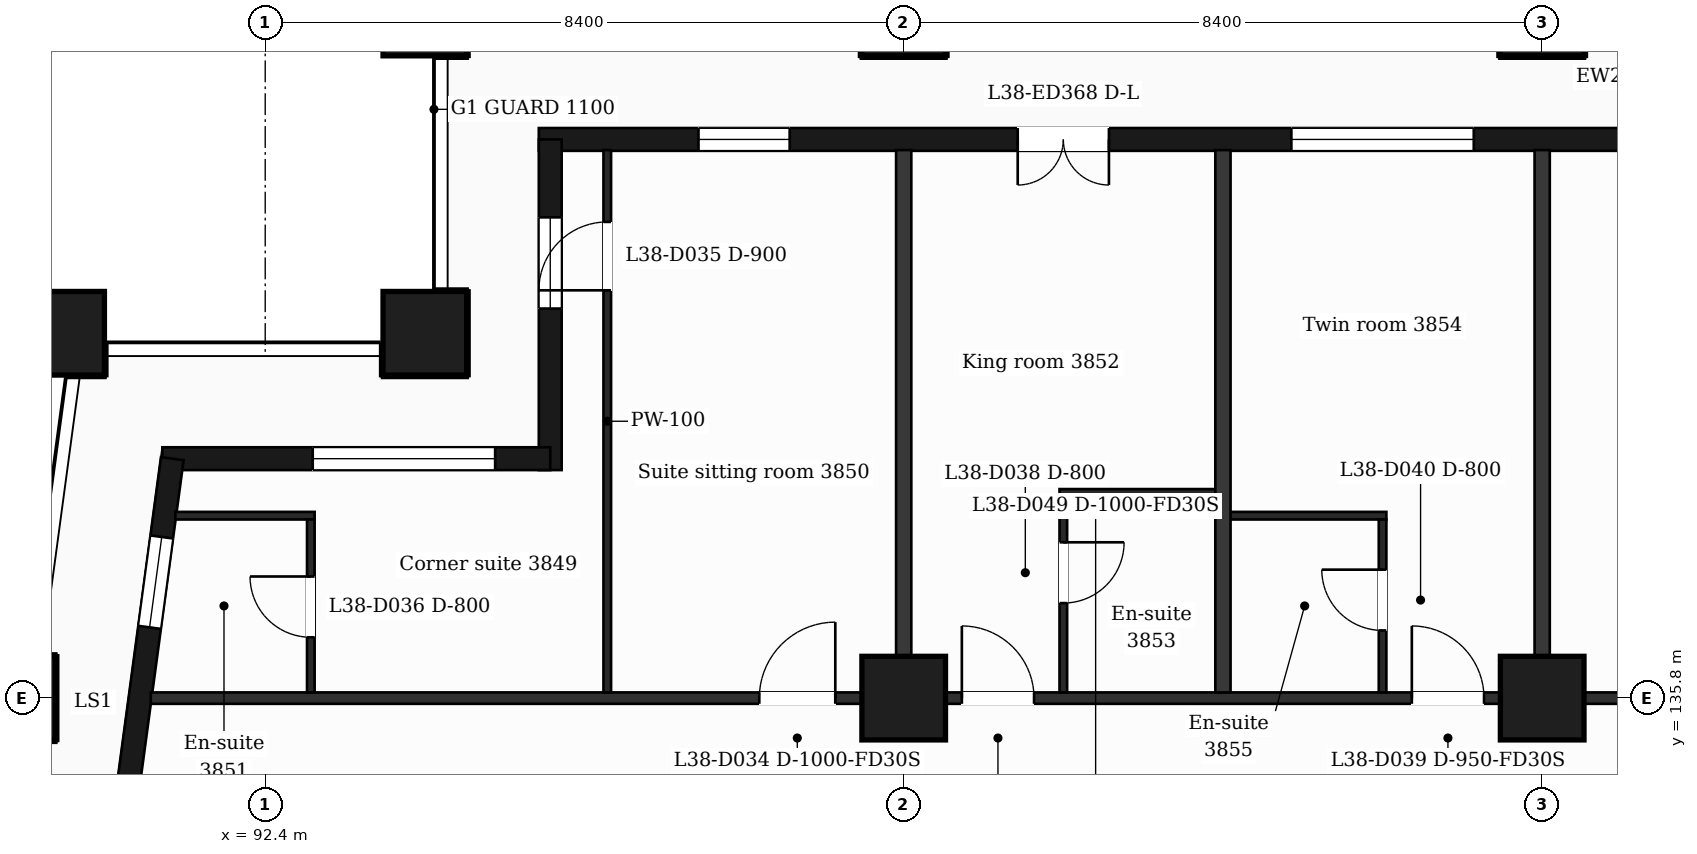
"""IFC4 building model, lengths in metres.
Left out: names, types, materials, properties, quantities, classifications, styles, units other than length and angle.
Written with IfcOpenShell. Run it as: python <this file> out.ifc"""

import sys

from ifc_helpers import new_model, si_unit, direction, frame, frame_2d, origin, origin_2d, place, context, subcontext, project, spatial, rectangle, extrude, element, fill, save


model = new_model("IFC4")
c1 = context("Model", 3, precision=1e-05, world=origin(), true_north=direction((0.0, 1.0)))
c2 = subcontext(c1, "Body", "Model", "MODEL_VIEW")
j1 = project(units=[si_unit("LENGTHUNIT", "METRE"), si_unit("PLANEANGLEUNIT", "RADIAN")], contexts=[c1])
p1 = place(None, origin())
s1 = spatial("IfcSite", under=j1, at=p1, CompositionType="ELEMENT")
p2 = place(p1, origin())
s2 = spatial("IfcBuilding", under=s1, at=p2, CompositionType="ELEMENT")
p3 = place(p2, frame((0.0, 0.0, 162.6)))
s3 = spatial("IfcBuildingStorey", under=s2, at=p3, CompositionType="ELEMENT", Elevation=162.6)
for number, where, z_axis, x_axis in (
    (1, (94.5, 140.6, 0.0), (0.0, 0.0, 1.0), (1.0, 0.0, 0.0)),
    (2, (89.735, 140.6, 0.0), (0.0, 0.0, 1.0), (1.0, 0.0, 0.0)),
    (3, (100.8, 135.8, 0.0), (0.0, 0.0, 1.0), (1.0, 0.0, 0.0)),
    (4, (109.2, 135.8, 0.0), (0.0, 0.0, 1.0), (1.0, 0.0, 0.0)),
    (5, (89.088, 135.8, 0.0), (0.0, 0.0, 1.0), (1.0, 0.0, 0.0)),
    (6, (100.8, 144.8, 0.0), (0.0, 0.0, 1.0), (1.0, 0.0, 0.0)),
    (7, (109.2, 144.8, 0.0), (0.0, 0.0, 1.0), (1.0, 0.0, 0.0)),
    (8, (94.5, 144.8, 0.0), (0.0, 0.0, 1.0), (1.0, 0.0, 0.0)),
):
    element("IfcColumn", number, at=place(p3, frame(where, z_axis=z_axis, x_axis=x_axis)), inside=s3, PredefinedType="COLUMN", context=c2, shape_type="SweptSolid", body=[
        extrude(rectangle(XDim=1.1, YDim=1.1, at=origin_2d()), origin(), (0.0, 0.0, 1.0), 3.7),
    ])
p4 = place(p3, frame((110.4, 143.15, 0.0), z_axis=(0.0, 0.0, 1.0), x_axis=(-1.0, 0.0, 0.0)))
e9 = element("IfcWall", 9, at=p4, inside=s3, PredefinedType="SOLIDWALL", context=c2, shape_type="SweptSolid", body=[
    extrude(rectangle(XDim=14.4, YDim=0.3, at=frame_2d((7.2, 0.0))), origin(), (0.0, 0.0, 1.0), 3.38),
])
p5 = place(p4, frame((2.1, 0.0, 0.9)))
e10 = element("IfcOpeningElement", 10, at=p5, cuts=e9, PredefinedType="OPENING", context=c2, shape_type="SweptSolid", body=[
    extrude(rectangle(XDim=2.4, YDim=2.1, at=frame_2d((1.2, 1.05))), frame((0.0, 0.16, 0.0), z_axis=(0.0, -1.0, 0.0), x_axis=(1.0, 0.0, 0.0)), (0.0, 0.0, 1.0), 0.32),
])
p6 = place(p4, frame((6.9, 0.0, 0.0)))
e11 = element("IfcOpeningElement", 11, at=p6, cuts=e9, PredefinedType="OPENING", context=c2, shape_type="SweptSolid", body=[
    extrude(rectangle(XDim=1.2, YDim=2.4, at=frame_2d((0.6, 1.2))), frame((0.0, 0.16, 0.0), z_axis=(0.0, -1.0, 0.0), x_axis=(1.0, 0.0, 0.0)), (0.0, 0.0, 1.0), 0.32),
])
p7 = place(p4, frame((11.1, 0.0, 0.9)))
e12 = element("IfcOpeningElement", 12, at=p7, cuts=e9, PredefinedType="OPENING", context=c2, shape_type="SweptSolid", body=[
    extrude(rectangle(XDim=1.2, YDim=2.1, at=frame_2d((0.6, 1.05))), frame((0.0, 0.16, 0.0), z_axis=(0.0, -1.0, 0.0), x_axis=(1.0, 0.0, 0.0)), (0.0, 0.0, 1.0), 0.32),
])
p8 = place(p3, frame((96.15, 143.15, 0.0), z_axis=(0.0, 0.0, 1.0), x_axis=(0.0, -1.0, 0.0)))
e13 = element("IfcWall", 13, at=p8, inside=s3, PredefinedType="SOLIDWALL", context=c2, shape_type="SweptSolid", body=[
    extrude(rectangle(XDim=4.35, YDim=0.3, at=frame_2d((2.175, 0.0))), origin(), (0.0, 0.0, 1.0), 3.38),
])
p9 = place(p8, frame((1.025, 0.0, 0.9)))
e14 = element("IfcOpeningElement", 14, at=p9, cuts=e13, PredefinedType="OPENING", context=c2, shape_type="SweptSolid", body=[
    extrude(rectangle(XDim=1.2, YDim=2.1, at=frame_2d((0.6, 1.05))), frame((0.0, 0.16, 0.0), z_axis=(0.0, -1.0, 0.0), x_axis=(1.0, 0.0, 0.0)), (0.0, 0.0, 1.0), 0.32),
])
p10 = place(p3, frame((96.15, 138.95, 0.0), z_axis=(0.0, 0.0, 1.0), x_axis=(-1.0, 0.0, 0.0)))
e15 = element("IfcWall", 15, at=p10, inside=s3, PredefinedType="SOLIDWALL", context=c2, shape_type="SweptSolid", body=[
    extrude(rectangle(XDim=5.104, YDim=0.3, at=frame_2d((2.552, 0.0))), origin(), (0.0, 0.0, 1.0), 3.38),
])
p11 = place(p10, frame((0.725, 0.0, 0.9)))
e16 = element("IfcOpeningElement", 16, at=p11, cuts=e15, PredefinedType="OPENING", context=c2, shape_type="SweptSolid", body=[
    extrude(rectangle(XDim=2.4, YDim=2.1, at=frame_2d((1.2, 1.05))), frame((0.0, 0.16, 0.0), z_axis=(0.0, -1.0, 0.0), x_axis=(1.0, 0.0, 0.0)), (0.0, 0.0, 1.0), 0.32),
])
p12 = place(p3, frame((91.177, 138.95, 0.0), z_axis=(0.0, 0.0, 1.0), x_axis=(-0.133426664613, -0.991058689065, 0.0)))
e17 = element("IfcWall", 17, at=p12, inside=s3, PredefinedType="SOLIDWALL", context=c2, shape_type="SweptSolid", body=[
    extrude(rectangle(XDim=6.609, YDim=0.3, at=frame_2d((3.305, 0.0))), origin(), (0.0, 0.0, 1.0), 3.38),
])
p13 = place(p12, frame((1.039, 0.0, 0.9)))
e18 = element("IfcOpeningElement", 18, at=p13, cuts=e17, PredefinedType="OPENING", context=c2, shape_type="SweptSolid", body=[
    extrude(rectangle(XDim=1.2, YDim=2.1, at=frame_2d((0.6, 1.05))), frame((0.0, 0.16, 0.0), z_axis=(0.0, -1.0, 0.0), x_axis=(1.0, 0.0, 0.0)), (0.0, 0.0, 1.0), 0.32),
])
p14 = place(p12, frame((4.294, 0.0, 0.0)))
e19 = element("IfcOpeningElement", 19, at=p14, cuts=e17, PredefinedType="OPENING", context=c2, shape_type="SweptSolid", body=[
    extrude(rectangle(XDim=1.2, YDim=2.4, at=frame_2d((0.6, 1.2))), frame((0.0, 0.16, 0.0), z_axis=(0.0, -1.0, 0.0), x_axis=(1.0, 0.0, 0.0)), (0.0, 0.0, 1.0), 0.32),
])
p15 = place(p3, frame((90.895, 135.8, 0.0), z_axis=(0.0, 0.0, 1.0), x_axis=(1.0, 0.0, 0.0)))
e20 = element("IfcWall", 20, at=p15, inside=s3, PredefinedType="PARTITIONING", context=c2, shape_type="SweptSolid", body=[
    extrude(rectangle(XDim=45.011, YDim=0.15, at=frame_2d((22.505, 0.0))), origin(), (0.0, 0.0, 1.0), 3.38),
])
p16 = place(p15, frame((8.005, 0.0, 0.0)))
e21 = element("IfcOpeningElement", 21, at=p16, cuts=e20, PredefinedType="OPENING", context=c2, shape_type="SweptSolid", body=[
    extrude(rectangle(XDim=1.0, YDim=2.1, at=frame_2d((0.5, 1.05))), frame((0.0, 0.085, 0.0), z_axis=(0.0, -1.0, 0.0), x_axis=(1.0, 0.0, 0.0)), (0.0, 0.0, 1.0), 0.17),
])
p17 = place(p15, frame((10.67, 0.0, 0.0)))
e22 = element("IfcOpeningElement", 22, at=p17, cuts=e20, PredefinedType="OPENING", context=c2, shape_type="SweptSolid", body=[
    extrude(rectangle(XDim=0.95, YDim=2.1, at=frame_2d((0.475, 1.05))), frame((0.0, 0.085, 0.0), z_axis=(0.0, -1.0, 0.0), x_axis=(1.0, 0.0, 0.0)), (0.0, 0.0, 1.0), 0.17),
])
p18 = place(p15, frame((16.59, 0.0, 0.0)))
e23 = element("IfcOpeningElement", 23, at=p18, cuts=e20, PredefinedType="OPENING", context=c2, shape_type="SweptSolid", body=[
    extrude(rectangle(XDim=0.95, YDim=2.1, at=frame_2d((0.475, 1.05))), frame((0.0, 0.085, 0.0), z_axis=(0.0, -1.0, 0.0), x_axis=(1.0, 0.0, 0.0)), (0.0, 0.0, 1.0), 0.17),
])
p19 = place(p15, frame((20.98, 0.0, 0.0)))
e24 = element("IfcOpeningElement", 24, at=p19, cuts=e20, PredefinedType="OPENING", context=c2, shape_type="SweptSolid", body=[
    extrude(rectangle(XDim=0.95, YDim=2.1, at=frame_2d((0.475, 1.05))), frame((0.0, 0.085, 0.0), z_axis=(0.0, -1.0, 0.0), x_axis=(1.0, 0.0, 0.0)), (0.0, 0.0, 1.0), 0.17),
])
p20 = place(p15, frame((29.335, 0.0, 0.0)))
e25 = element("IfcOpeningElement", 25, at=p20, cuts=e20, PredefinedType="OPENING", context=c2, shape_type="SweptSolid", body=[
    extrude(rectangle(XDim=0.95, YDim=2.1, at=frame_2d((0.475, 1.05))), frame((0.0, 0.085, 0.0), z_axis=(0.0, -1.0, 0.0), x_axis=(1.0, 0.0, 0.0)), (0.0, 0.0, 1.0), 0.17),
])
p21 = place(p15, frame((31.156, 0.0, 0.0)))
e26 = element("IfcOpeningElement", 26, at=p21, cuts=e20, PredefinedType="OPENING", context=c2, shape_type="SweptSolid", body=[
    extrude(rectangle(XDim=1.0, YDim=2.1, at=frame_2d((0.5, 1.05))), frame((0.0, 0.085, 0.0), z_axis=(0.0, -1.0, 0.0), x_axis=(1.0, 0.0, 0.0)), (0.0, 0.0, 1.0), 0.17),
])
p22 = place(p15, frame((39.814, 0.0, 0.0)))
e27 = element("IfcOpeningElement", 27, at=p22, cuts=e20, PredefinedType="OPENING", context=c2, shape_type="SweptSolid", body=[
    extrude(rectangle(XDim=0.95, YDim=2.1, at=frame_2d((0.475, 1.05))), frame((0.0, 0.085, 0.0), z_axis=(0.0, -1.0, 0.0), x_axis=(1.0, 0.0, 0.0)), (0.0, 0.0, 1.0), 0.17),
])
p23 = place(p3, frame((91.218, 138.2, 0.0), z_axis=(0.0, 0.0, 1.0), x_axis=(1.0, 0.0, 0.0)))
e28 = element("IfcWall", 28, at=p23, inside=s3, PredefinedType="PARTITIONING", context=c2, shape_type="SweptSolid", body=[
    extrude(rectangle(XDim=1.832, YDim=0.1, at=frame_2d((0.916, 0.0))), origin(), (0.0, 0.0, 1.0), 3.38),
])
for number, where, z_axis, x_axis in (
    (29, (105.0, 138.2, 0.0), (0.0, 0.0, 1.0), (1.0, 0.0, 0.0)),
    (30, (102.85, 138.5, 0.0), (0.0, 0.0, 1.0), (1.0, 0.0, 0.0)),
):
    element("IfcWall", number, at=place(p3, frame(where, z_axis=z_axis, x_axis=x_axis)), inside=s3, PredefinedType="PARTITIONING", context=c2, shape_type="SweptSolid", body=[
        extrude(rectangle(XDim=2.15, YDim=0.1, at=frame_2d((1.075, 0.0))), origin(), (0.0, 0.0, 1.0), 3.38),
    ])
p24 = place(p3, frame((93.0, 135.875, 0.0), z_axis=(0.0, 0.0, 1.0), x_axis=(0.0, 1.0, 0.0)))
e31 = element("IfcWall", 31, at=p24, inside=s3, PredefinedType="PARTITIONING", context=c2, shape_type="SweptSolid", body=[
    extrude(rectangle(XDim=2.275, YDim=0.1, at=frame_2d((1.137, 0.0))), origin(), (0.0, 0.0, 1.0), 3.38),
])
p25 = place(p24, frame((0.725, 0.0, 0.0)))
e32 = element("IfcOpeningElement", 32, at=p25, cuts=e31, PredefinedType="OPENING", context=c2, shape_type="SweptSolid", body=[
    extrude(rectangle(XDim=0.8, YDim=2.1, at=frame_2d((0.4, 1.05))), frame((0.0, 0.06, 0.0), z_axis=(0.0, -1.0, 0.0), x_axis=(1.0, 0.0, 0.0)), (0.0, 0.0, 1.0), 0.12),
])
p26 = place(p3, frame((96.9, 135.875, 0.0), z_axis=(0.0, 0.0, 1.0), x_axis=(0.0, 1.0, 0.0)))
e33 = element("IfcWall", 33, at=p26, inside=s3, PredefinedType="PARTITIONING", context=c2, shape_type="SweptSolid", body=[
    extrude(rectangle(XDim=7.135, YDim=0.1, at=frame_2d((3.567, 0.0))), origin(), (0.0, 0.0, 1.0), 3.38),
])
p27 = place(p26, frame((5.29, 0.0, 0.0)))
e34 = element("IfcOpeningElement", 34, at=p27, cuts=e33, PredefinedType="OPENING", context=c2, shape_type="SweptSolid", body=[
    extrude(rectangle(XDim=0.9, YDim=2.1, at=frame_2d((0.45, 1.05))), frame((0.0, 0.06, 0.0), z_axis=(0.0, -1.0, 0.0), x_axis=(1.0, 0.0, 0.0)), (0.0, 0.0, 1.0), 0.12),
])
p28 = place(p3, frame((100.8, 135.875, 0.0), z_axis=(0.0, 0.0, 1.0), x_axis=(0.0, 1.0, 0.0)))
e35 = element("IfcWall", 35, at=p28, inside=s3, PredefinedType="PARTITIONING", context=c2, shape_type="SweptSolid", body=[
    extrude(rectangle(XDim=7.135, YDim=0.2, at=frame_2d((3.567, 0.0))), origin(), (0.0, 0.0, 1.0), 3.38),
])
p29 = place(p3, frame((102.9, 135.875, 0.0), z_axis=(0.0, 0.0, 1.0), x_axis=(0.0, 1.0, 0.0)))
e36 = element("IfcWall", 36, at=p29, inside=s3, PredefinedType="PARTITIONING", context=c2, shape_type="SweptSolid", body=[
    extrude(rectangle(XDim=2.575, YDim=0.1, at=frame_2d((1.288, 0.0))), origin(), (0.0, 0.0, 1.0), 3.38),
])
p30 = place(p29, frame((1.175, 0.0, 0.0)))
e37 = element("IfcOpeningElement", 37, at=p30, cuts=e36, PredefinedType="OPENING", context=c2, shape_type="SweptSolid", body=[
    extrude(rectangle(XDim=0.8, YDim=2.1, at=frame_2d((0.4, 1.05))), frame((0.0, 0.06, 0.0), z_axis=(0.0, -1.0, 0.0), x_axis=(1.0, 0.0, 0.0)), (0.0, 0.0, 1.0), 0.12),
])
p31 = place(p3, frame((105.0, 135.875, 0.0), z_axis=(0.0, 0.0, 1.0), x_axis=(0.0, 1.0, 0.0)))
e38 = element("IfcWall", 38, at=p31, inside=s3, PredefinedType="PARTITIONING", context=c2, shape_type="SweptSolid", body=[
    extrude(rectangle(XDim=7.135, YDim=0.2, at=frame_2d((3.567, 0.0))), origin(), (0.0, 0.0, 1.0), 3.38),
])
p32 = place(p3, frame((107.1, 135.875, 0.0), z_axis=(0.0, 0.0, 1.0), x_axis=(0.0, 1.0, 0.0)))
e39 = element("IfcWall", 39, at=p32, inside=s3, PredefinedType="PARTITIONING", context=c2, shape_type="SweptSolid", body=[
    extrude(rectangle(XDim=2.275, YDim=0.1, at=frame_2d((1.137, 0.0))), origin(), (0.0, 0.0, 1.0), 3.38),
])
p33 = place(p32, frame((0.815, 0.0, 0.0)))
e40 = element("IfcOpeningElement", 40, at=p33, cuts=e39, PredefinedType="OPENING", context=c2, shape_type="SweptSolid", body=[
    extrude(rectangle(XDim=0.8, YDim=2.1, at=frame_2d((0.4, 1.05))), frame((0.0, 0.06, 0.0), z_axis=(0.0, -1.0, 0.0), x_axis=(1.0, 0.0, 0.0)), (0.0, 0.0, 1.0), 0.12),
])
p34 = place(p3, frame((109.2, 135.875, 0.0), z_axis=(0.0, 0.0, 1.0), x_axis=(0.0, 1.0, 0.0)))
e41 = element("IfcWall", 41, at=p34, inside=s3, PredefinedType="PARTITIONING", context=c2, shape_type="SweptSolid", body=[
    extrude(rectangle(XDim=7.135, YDim=0.2, at=frame_2d((3.567, 0.0))), origin(), (0.0, 0.0, 1.0), 3.38),
])
p35 = place(p5, origin())
e42 = element("IfcWindow", 42, at=p35, inside=s3, PartitioningType="SINGLE_PANEL", PredefinedType="WINDOW", context=c2, shape_type="SweptSolid", body=[
    extrude(rectangle(XDim=2.4, YDim=2.1, at=frame_2d((1.2, 1.05))), frame((0.0, 0.03, 0.0), z_axis=(0.0, -1.0, 0.0), x_axis=(1.0, 0.0, 0.0)), (0.0, 0.0, 1.0), 0.06),
])
fill(e10, e42)
p36 = place(p6, origin())
e43 = element("IfcDoor", 43, at=p36, inside=s3, OperationType="DOUBLE_DOOR_SINGLE_SWING", PredefinedType="DOOR", context=c2, shape_type="SweptSolid", body=[
    extrude(rectangle(XDim=1.2, YDim=2.4, at=frame_2d((0.6, 1.2))), frame((0.0, 0.025, 0.0), z_axis=(0.0, -1.0, 0.0), x_axis=(1.0, 0.0, 0.0)), (0.0, 0.0, 1.0), 0.05),
])
fill(e11, e43)
p37 = place(p7, origin())
e44 = element("IfcWindow", 44, at=p37, inside=s3, PartitioningType="SINGLE_PANEL", PredefinedType="WINDOW", context=c2, shape_type="SweptSolid", body=[
    extrude(rectangle(XDim=1.2, YDim=2.1, at=frame_2d((0.6, 1.05))), frame((0.0, 0.03, 0.0), z_axis=(0.0, -1.0, 0.0), x_axis=(1.0, 0.0, 0.0)), (0.0, 0.0, 1.0), 0.06),
])
fill(e12, e44)
p38 = place(p9, origin())
e45 = element("IfcWindow", 45, at=p38, inside=s3, PartitioningType="SINGLE_PANEL", PredefinedType="WINDOW", context=c2, shape_type="SweptSolid", body=[
    extrude(rectangle(XDim=1.2, YDim=2.1, at=frame_2d((0.6, 1.05))), frame((0.0, 0.03, 0.0), z_axis=(0.0, -1.0, 0.0), x_axis=(1.0, 0.0, 0.0)), (0.0, 0.0, 1.0), 0.06),
])
fill(e14, e45)
p39 = place(p11, origin())
e46 = element("IfcWindow", 46, at=p39, inside=s3, PartitioningType="SINGLE_PANEL", PredefinedType="WINDOW", context=c2, shape_type="SweptSolid", body=[
    extrude(rectangle(XDim=2.4, YDim=2.1, at=frame_2d((1.2, 1.05))), frame((0.0, 0.03, 0.0), z_axis=(0.0, -1.0, 0.0), x_axis=(1.0, 0.0, 0.0)), (0.0, 0.0, 1.0), 0.06),
])
fill(e16, e46)
p40 = place(p13, origin())
e47 = element("IfcWindow", 47, at=p40, inside=s3, PartitioningType="SINGLE_PANEL", PredefinedType="WINDOW", context=c2, shape_type="SweptSolid", body=[
    extrude(rectangle(XDim=1.2, YDim=2.1, at=frame_2d((0.6, 1.05))), frame((0.0, 0.03, 0.0), z_axis=(0.0, -1.0, 0.0), x_axis=(1.0, 0.0, 0.0)), (0.0, 0.0, 1.0), 0.06),
])
fill(e18, e47)
p41 = place(p16, origin())
e48 = element("IfcDoor", 48, at=p41, inside=s3, OperationType="SINGLE_SWING_RIGHT", PredefinedType="DOOR", context=c2, shape_type="SweptSolid", body=[
    extrude(rectangle(XDim=1.0, YDim=2.1, at=frame_2d((0.5, 1.05))), frame((0.0, 0.025, 0.0), z_axis=(0.0, -1.0, 0.0), x_axis=(1.0, 0.0, 0.0)), (0.0, 0.0, 1.0), 0.05),
])
fill(e21, e48)
p42 = place(p27, origin())
e49 = element("IfcDoor", 49, at=p42, inside=s3, OperationType="SINGLE_SWING_LEFT", PredefinedType="DOOR", context=c2, shape_type="SweptSolid", body=[
    extrude(rectangle(XDim=0.9, YDim=2.1, at=frame_2d((0.45, 1.05))), frame((0.0, 0.025, 0.0), z_axis=(0.0, -1.0, 0.0), x_axis=(1.0, 0.0, 0.0)), (0.0, 0.0, 1.0), 0.05),
])
fill(e34, e49)
p43 = place(p25, origin())
e50 = element("IfcDoor", 50, at=p43, inside=s3, OperationType="SINGLE_SWING_RIGHT", PredefinedType="DOOR", context=c2, shape_type="SweptSolid", body=[
    extrude(rectangle(XDim=0.8, YDim=2.1, at=frame_2d((0.4, 1.05))), frame((0.0, 0.025, 0.0), z_axis=(0.0, -1.0, 0.0), x_axis=(1.0, 0.0, 0.0)), (0.0, 0.0, 1.0), 0.05),
])
fill(e32, e50)
p44 = place(p17, origin())
e51 = element("IfcDoor", 51, at=p44, inside=s3, OperationType="SINGLE_SWING_LEFT", PredefinedType="DOOR", context=c2, shape_type="SweptSolid", body=[
    extrude(rectangle(XDim=0.95, YDim=2.1, at=frame_2d((0.475, 1.05))), frame((0.0, 0.025, 0.0), z_axis=(0.0, -1.0, 0.0), x_axis=(1.0, 0.0, 0.0)), (0.0, 0.0, 1.0), 0.05),
])
fill(e22, e51)
p45 = place(p30, origin())
e52 = element("IfcDoor", 52, at=p45, inside=s3, OperationType="SINGLE_SWING_RIGHT", PredefinedType="DOOR", context=c2, shape_type="SweptSolid", body=[
    extrude(rectangle(XDim=0.8, YDim=2.1, at=frame_2d((0.4, 1.05))), frame((0.0, 0.025, 0.0), z_axis=(0.0, -1.0, 0.0), x_axis=(1.0, 0.0, 0.0)), (0.0, 0.0, 1.0), 0.05),
])
fill(e37, e52)
p46 = place(p18, origin())
e53 = element("IfcDoor", 53, at=p46, inside=s3, OperationType="SINGLE_SWING_LEFT", PredefinedType="DOOR", context=c2, shape_type="SweptSolid", body=[
    extrude(rectangle(XDim=0.95, YDim=2.1, at=frame_2d((0.475, 1.05))), frame((0.0, 0.025, 0.0), z_axis=(0.0, -1.0, 0.0), x_axis=(1.0, 0.0, 0.0)), (0.0, 0.0, 1.0), 0.05),
])
fill(e23, e53)
p47 = place(p33, origin())
e54 = element("IfcDoor", 54, at=p47, inside=s3, OperationType="SINGLE_SWING_RIGHT", PredefinedType="DOOR", context=c2, shape_type="SweptSolid", body=[
    extrude(rectangle(XDim=0.8, YDim=2.1, at=frame_2d((0.4, 1.05))), frame((0.0, 0.025, 0.0), z_axis=(0.0, -1.0, 0.0), x_axis=(1.0, 0.0, 0.0)), (0.0, 0.0, 1.0), 0.05),
])
fill(e40, e54)
save(model, sys.argv[1])
